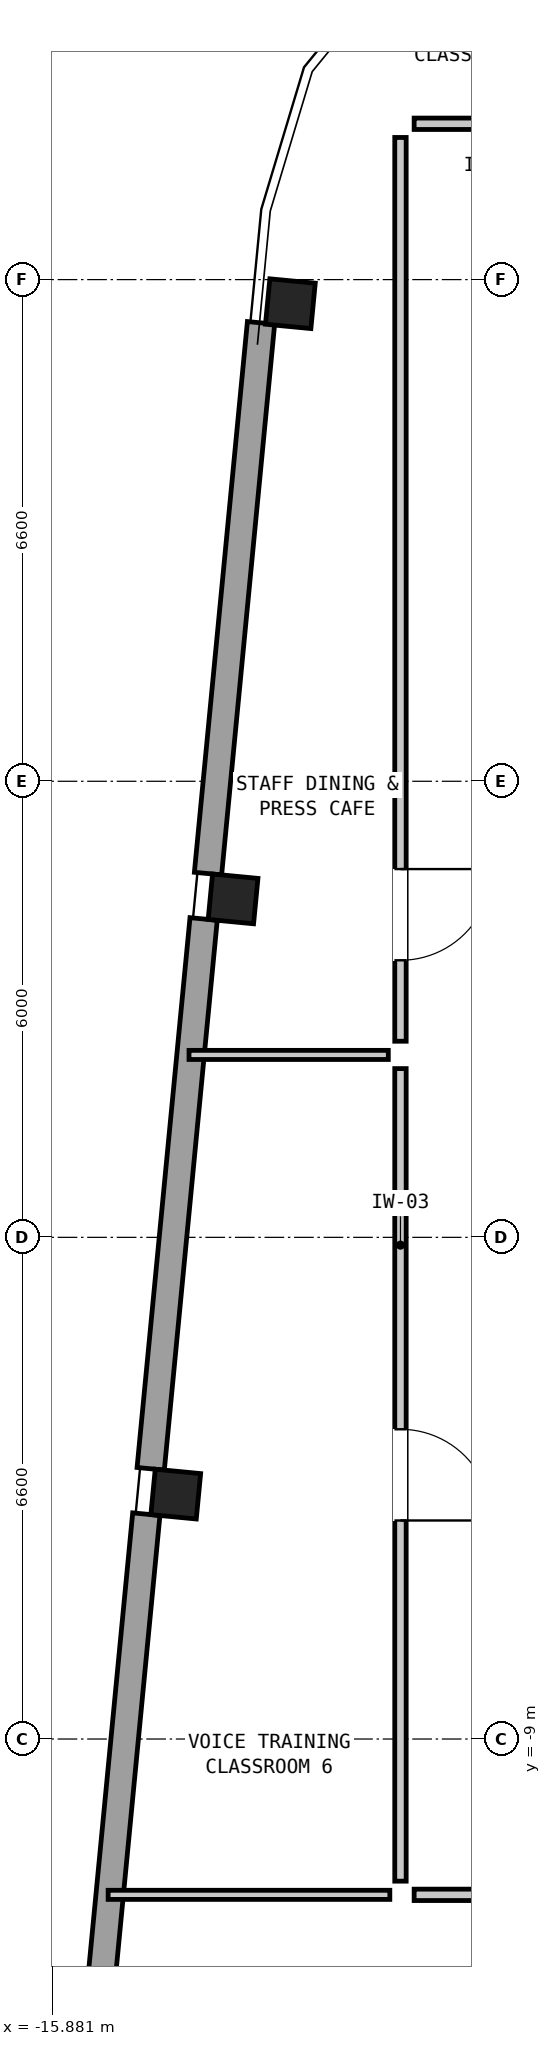
"""IFC4 building model, lengths in metres.
Left out: names, types, materials, properties, quantities, classifications, styles, units other than length and angle.
Written with IfcOpenShell. Run it as: python <this file> out.ifc"""

import sys

from ifc_helpers import new_model, si_unit, direction, frame, frame_2d, origin, origin_2d, place, context, subcontext, project, spatial, rectangle, hollow_rectangle, extrude, element, fill, save


model = new_model("IFC4")
c1 = context("Model", 3, precision=1e-05, world=origin(), true_north=direction((0.0, 1.0)))
c2 = subcontext(c1, "Body", "Model", "MODEL_VIEW")
j1 = project(units=[si_unit("LENGTHUNIT", "METRE"), si_unit("PLANEANGLEUNIT", "RADIAN")], contexts=[c1])
p1 = place(None, origin())
s1 = spatial("IfcSite", under=j1, at=p1, CompositionType="ELEMENT")
p2 = place(p1, origin())
s2 = spatial("IfcBuilding", under=s1, at=p2, CompositionType="ELEMENT")
p3 = place(p2, frame((0.0, 0.0, 267.25)))
s3 = spatial("IfcBuildingStorey", under=s2, at=p3, CompositionType="ELEMENT", Elevation=267.25)
for number, where, z_axis, x_axis in (
    (1, (-12.749, 9.883, 0.0), (0.0, 0.0, 1.0), (0.096, 0.995, 0.0)),
    (2, (-13.502, 2.052, 0.0), (0.0, 0.0, 1.0), (0.096, 0.995, 0.0)),
    (3, (-14.256, -5.778, 0.0), (0.0, 0.0, 1.0), (0.096, 0.995, 0.0)),
):
    element("IfcColumn", number, at=place(p3, frame(where, z_axis=z_axis, x_axis=x_axis)), inside=s3, PredefinedType="COLUMN", context=c2, shape_type="SweptSolid", body=[
        extrude(hollow_rectangle(XDim=0.6, YDim=0.6, WallThickness=0.04, at=origin_2d()), origin(), (0.0, 0.0, 1.0), 3.05),
    ])
p4 = place(p3, frame((-15.341, -13.287, 0.0), z_axis=(0.0, 0.0, 1.0), x_axis=(0.095863240394, 0.995394514321, 0.0)))
e4 = element("IfcWall", 4, at=p4, inside=s3, PredefinedType="SOLIDWALL", context=c2, shape_type="SweptSolid", body=[
    extrude(rectangle(XDim=7.279, YDim=0.36, at=frame_2d((3.639, 0.0))), origin(), (0.0, 0.0, 1.0), 0.98),
])
p5 = place(p3, frame((-14.586, -5.445, 0.0), z_axis=(0.0, 0.0, 1.0), x_axis=(0.095820598258, 0.995398620126, 0.0)))
e5 = element("IfcWall", 5, at=p5, inside=s3, PredefinedType="SOLIDWALL", context=c2, shape_type="SweptSolid", body=[
    extrude(rectangle(XDim=7.267, YDim=0.36, at=frame_2d((3.633, 0.0))), origin(), (0.0, 0.0, 1.0), 0.98),
])
p6 = place(p3, frame((-13.832, 2.385, 0.0), z_axis=(0.0, 0.0, 1.0), x_axis=(0.095826806958, 0.995398022435, 0.0)))
e6 = element("IfcWall", 6, at=p6, inside=s3, PredefinedType="SOLIDWALL", context=c2, shape_type="SweptSolid", body=[
    extrude(rectangle(XDim=7.279, YDim=0.36, at=frame_2d((3.639, 0.0))), origin(), (0.0, 0.0, 1.0), 0.98),
])
p7 = place(p3, frame((-15.146, -11.05, 0.0), z_axis=(0.0, 0.0, 1.0), x_axis=(1.0, 0.0, 0.0)))
e7 = element("IfcWall", 7, at=p7, inside=s3, PredefinedType="PARTITIONING", context=c2, shape_type="SweptSolid", body=[
    extrude(rectangle(XDim=3.706, YDim=0.12, at=frame_2d((1.853, 0.0))), origin(), (0.0, 0.0, 1.0), 2.86),
])
p8 = place(p3, frame((-14.082, 0.0, 0.0), z_axis=(0.0, 0.0, 1.0), x_axis=(1.0, 0.0, 0.0)))
e8 = element("IfcWall", 8, at=p8, inside=s3, PredefinedType="PARTITIONING", context=c2, shape_type="SweptSolid", body=[
    extrude(rectangle(XDim=2.622, YDim=0.12, at=frame_2d((1.311, 0.0))), origin(), (0.0, 0.0, 1.0), 2.86),
])
p9 = place(p3, frame((-11.12, 12.25, 0.0), z_axis=(0.0, 0.0, 1.0), x_axis=(1.0, 0.0, 0.0)))
e9 = element("IfcWall", 9, at=p9, inside=s3, PredefinedType="PARTITIONING", context=c2, shape_type="SweptSolid", body=[
    extrude(rectangle(XDim=5.54, YDim=0.15, at=frame_2d((2.77, 0.0))), origin(), (0.0, 0.0, 1.0), 2.86),
])
p10 = place(p9, frame((2.17, 0.0, 0.0)))
e10 = element("IfcOpeningElement", 10, at=p10, cuts=e9, PredefinedType="OPENING", context=c2, shape_type="SweptSolid", body=[
    extrude(rectangle(XDim=1.2, YDim=2.1, at=frame_2d((0.6, 1.05))), frame((0.0, 0.087, 0.0), z_axis=(0.0, -1.0, 0.0), x_axis=(1.0, 0.0, 0.0)), (0.0, 0.0, 1.0), 0.174),
])
p11 = place(p3, frame((-11.12, -11.05, 0.0), z_axis=(0.0, 0.0, 1.0), x_axis=(1.0, 0.0, 0.0)))
e11 = element("IfcWall", 11, at=p11, inside=s3, PredefinedType="PARTITIONING", context=c2, shape_type="SweptSolid", body=[
    extrude(rectangle(XDim=10.94, YDim=0.15, at=frame_2d((5.47, 0.0))), origin(), (0.0, 0.0, 1.0), 2.86),
])
p12 = place(p11, frame((4.87, 0.0, 0.0)))
e12 = element("IfcOpeningElement", 12, at=p12, cuts=e11, PredefinedType="OPENING", context=c2, shape_type="SweptSolid", body=[
    extrude(rectangle(XDim=1.2, YDim=2.1, at=frame_2d((0.6, 1.05))), frame((0.0, 0.087, 0.0), z_axis=(0.0, -1.0, 0.0), x_axis=(1.0, 0.0, 0.0)), (0.0, 0.0, 1.0), 0.174),
])
p13 = place(p3, frame((-11.3, -0.18, 0.0), z_axis=(0.0, 0.0, 1.0), x_axis=(0.0, -1.0, 0.0)))
e13 = element("IfcWall", 13, at=p13, inside=s3, PredefinedType="PARTITIONING", context=c2, shape_type="SweptSolid", body=[
    extrude(rectangle(XDim=10.69, YDim=0.15, at=frame_2d((5.345, 0.0))), origin(), (0.0, 0.0, 1.0), 2.86),
])
p14 = place(p13, frame((4.745, 0.0, 0.0)))
e14 = element("IfcOpeningElement", 14, at=p14, cuts=e13, PredefinedType="OPENING", context=c2, shape_type="SweptSolid", body=[
    extrude(rectangle(XDim=1.2, YDim=2.1, at=frame_2d((0.6, 1.05))), frame((0.0, 0.087, 0.0), z_axis=(0.0, -1.0, 0.0), x_axis=(1.0, 0.0, 0.0)), (0.0, 0.0, 1.0), 0.174),
])
p15 = place(p3, frame((-11.3, 12.07, 0.0), z_axis=(0.0, 0.0, 1.0), x_axis=(0.0, -1.0, 0.0)))
e15 = element("IfcWall", 15, at=p15, inside=s3, PredefinedType="PARTITIONING", context=c2, shape_type="SweptSolid", body=[
    extrude(rectangle(XDim=11.89, YDim=0.15, at=frame_2d((5.945, 0.0))), origin(), (0.0, 0.0, 1.0), 2.86),
])
p16 = place(p15, frame((9.625, 0.0, 0.0)))
e16 = element("IfcOpeningElement", 16, at=p16, cuts=e15, PredefinedType="OPENING", context=c2, shape_type="SweptSolid", body=[
    extrude(rectangle(XDim=1.2, YDim=2.1, at=frame_2d((0.6, 1.05))), frame((0.0, 0.087, 0.0), z_axis=(0.0, -1.0, 0.0), x_axis=(1.0, 0.0, 0.0)), (0.0, 0.0, 1.0), 0.174),
])
p17 = place(p14, origin())
e17 = element("IfcDoor", 17, at=p17, inside=s3, OperationType="SINGLE_SWING_RIGHT", PredefinedType="DOOR", context=c2, shape_type="SweptSolid", body=[
    extrude(rectangle(XDim=1.2, YDim=2.1, at=frame_2d((0.6, 1.05))), frame((0.0, 0.025, 0.0), z_axis=(0.0, -1.0, 0.0), x_axis=(1.0, 0.0, 0.0)), (0.0, 0.0, 1.0), 0.05),
])
fill(e14, e17)
p18 = place(p16, origin())
e18 = element("IfcDoor", 18, at=p18, inside=s3, OperationType="SINGLE_SWING_LEFT", PredefinedType="DOOR", context=c2, shape_type="SweptSolid", body=[
    extrude(rectangle(XDim=1.2, YDim=2.1, at=frame_2d((0.6, 1.05))), frame((0.0, 0.025, 0.0), z_axis=(0.0, -1.0, 0.0), x_axis=(1.0, 0.0, 0.0)), (0.0, 0.0, 1.0), 0.05),
])
fill(e16, e18)
save(model, sys.argv[1])
